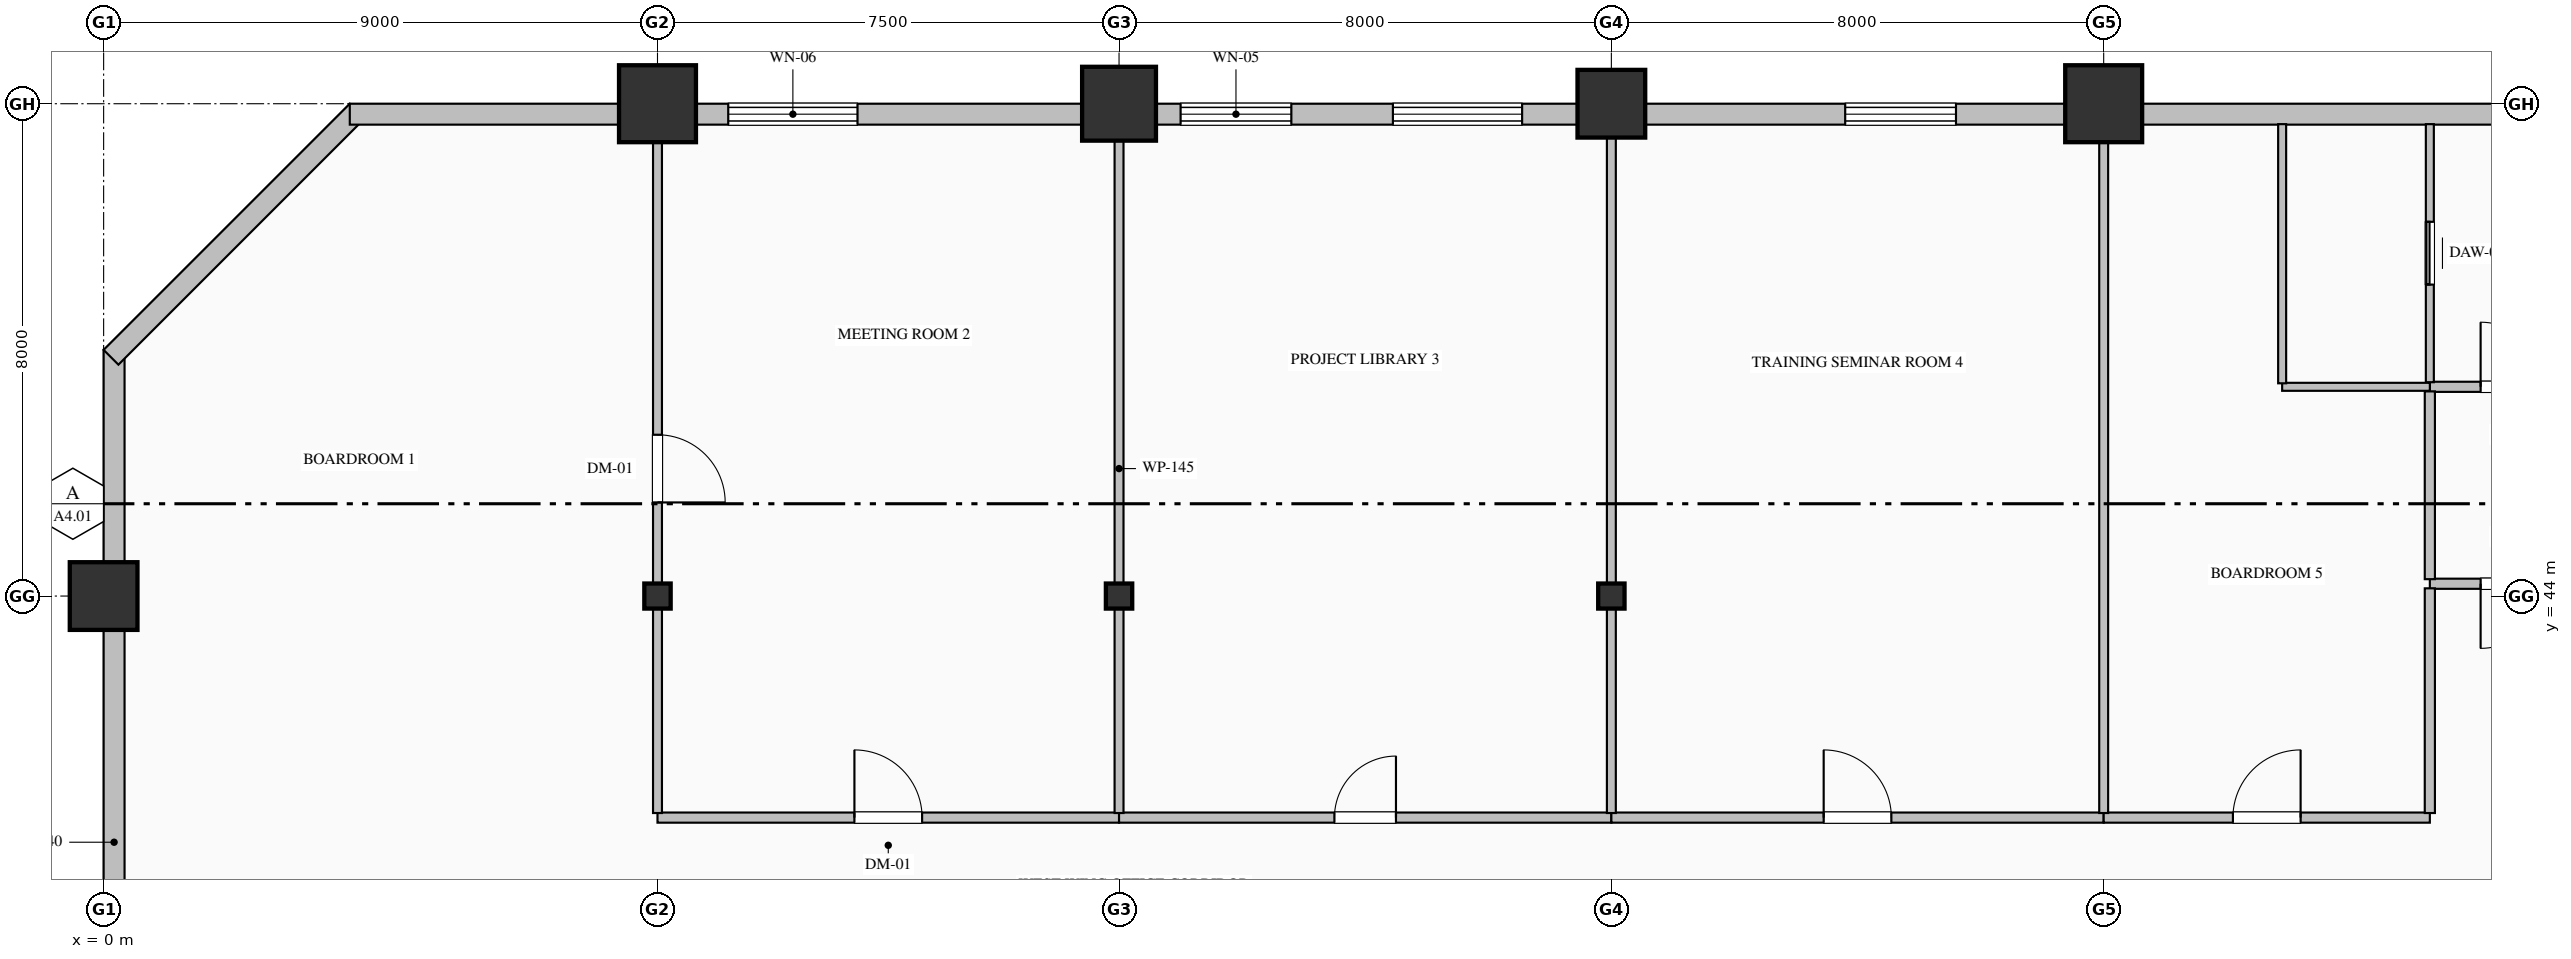
"""IFC4 building model, lengths in metres.
Left out: names, types, materials, properties, quantities, classifications, styles, units other than length and angle.
Written with IfcOpenShell. Run it as: python <this file> out.ifc"""

import sys

from ifc_helpers import new_model, si_unit, direction, frame, frame_2d, origin, origin_2d, place, context, subcontext, project, spatial, rectangle, hollow_rectangle, hollow_circle, i_section, extrude, element, fill, save


model = new_model("IFC4")
c1 = context("Model", 3, precision=1e-05, world=origin(), true_north=direction((0.0, 1.0)))
c2 = subcontext(c1, "Body", "Model", "MODEL_VIEW")
j1 = project(units=[si_unit("LENGTHUNIT", "METRE"), si_unit("PLANEANGLEUNIT", "RADIAN")], contexts=[c1])
p1 = place(None, origin())
s1 = spatial("IfcSite", under=j1, at=p1, CompositionType="ELEMENT")
p2 = place(p1, origin())
s2 = spatial("IfcBuilding", under=s1, at=p2, CompositionType="ELEMENT")
p3 = place(p2, frame((0.0, 0.0, 44.2)))
s3 = spatial("IfcBuildingStorey", under=s2, at=p3, CompositionType="ELEMENT", Elevation=44.2)
p4 = place(p3, frame((0.0, 44.0, 0.0), z_axis=(0.0, 0.0, 1.0), x_axis=(1.0, 0.0, 0.0)))
e1 = element("IfcColumn", 1, at=p4, inside=s3, PredefinedType="COLUMN", context=c2, shape_type="SweptSolid", body=[
    extrude(hollow_rectangle(XDim=1.1, YDim=1.1, WallThickness=0.04, at=origin_2d()), origin(), (0.0, 0.0, 1.0), 4.0),
])
p5 = place(p3, frame((9.0, 44.0, 0.0), z_axis=(0.0, 0.0, 1.0), x_axis=(1.0, 0.0, 0.0)))
e2 = element("IfcColumn", 2, at=p5, inside=s3, PredefinedType="COLUMN", context=c2, shape_type="SweptSolid", body=[
    extrude(i_section(OverallWidth=0.407, OverallDepth=0.428, WebThickness=0.02, FlangeThickness=0.035, FilletRadius=0.022, at=origin_2d()), origin(), (0.0, 0.0, 1.0), 4.0),
])
p6 = place(p3, frame((9.0, 52.0, 0.0), z_axis=(0.0, 0.0, 1.0), x_axis=(1.0, 0.0, 0.0)))
e3 = element("IfcColumn", 3, at=p6, inside=s3, PredefinedType="COLUMN", context=c2, shape_type="SweptSolid", body=[
    extrude(hollow_rectangle(XDim=1.25, YDim=1.25, WallThickness=0.045, at=origin_2d()), origin(), (0.0, 0.0, 1.0), 4.0),
])
p7 = place(p3, frame((16.5, 44.0, 0.0), z_axis=(0.0, 0.0, 1.0), x_axis=(1.0, 0.0, 0.0)))
e4 = element("IfcColumn", 4, at=p7, inside=s3, PredefinedType="COLUMN", context=c2, shape_type="SweptSolid", body=[
    extrude(i_section(OverallWidth=0.407, OverallDepth=0.428, WebThickness=0.02, FlangeThickness=0.035, FilletRadius=0.022, at=origin_2d()), origin(), (0.0, 0.0, 1.0), 4.0),
])
p8 = place(p3, frame((16.5, 52.0, 0.0), z_axis=(0.0, 0.0, 1.0), x_axis=(1.0, 0.0, 0.0)))
e5 = element("IfcColumn", 5, at=p8, inside=s3, PredefinedType="COLUMN", context=c2, shape_type="SweptSolid", body=[
    extrude(hollow_circle(Radius=0.6, WallThickness=0.04, at=origin_2d()), origin(), (0.0, 0.0, 1.0), 4.0),
])
p9 = place(p3, frame((24.5, 44.0, 0.0), z_axis=(0.0, 0.0, 1.0), x_axis=(1.0, 0.0, 0.0)))
e6 = element("IfcColumn", 6, at=p9, inside=s3, PredefinedType="COLUMN", context=c2, shape_type="SweptSolid", body=[
    extrude(i_section(OverallWidth=0.407, OverallDepth=0.428, WebThickness=0.02, FlangeThickness=0.035, FilletRadius=0.022, at=origin_2d()), origin(), (0.0, 0.0, 1.0), 4.0),
])
p10 = place(p3, frame((24.5, 52.0, 0.0), z_axis=(0.0, 0.0, 1.0), x_axis=(1.0, 0.0, 0.0)))
e7 = element("IfcColumn", 7, at=p10, inside=s3, PredefinedType="COLUMN", context=c2, shape_type="SweptSolid", body=[
    extrude(hollow_rectangle(XDim=1.1, YDim=1.1, WallThickness=0.04, at=origin_2d()), origin(), (0.0, 0.0, 1.0), 4.0),
])
p11 = place(p3, frame((32.5, 52.0, 0.0), z_axis=(0.0, 0.0, 1.0), x_axis=(1.0, 0.0, 0.0)))
e8 = element("IfcColumn", 8, at=p11, inside=s3, PredefinedType="COLUMN", context=c2, shape_type="SweptSolid", body=[
    extrude(hollow_rectangle(XDim=1.25, YDim=1.25, WallThickness=0.045, at=origin_2d()), origin(), (0.0, 0.0, 1.0), 4.0),
])
p12 = place(p3, frame((0.17, 32.0, 0.0), z_axis=(0.0, 0.0, 1.0), x_axis=(0.0, 1.0, 0.0)))
e9 = element("IfcWall", 9, at=p12, inside=s3, PredefinedType="SOLIDWALL", context=c2, shape_type="SweptSolid", body=[
    extrude(rectangle(XDim=16.0, YDim=0.34, at=frame_2d((8.0, 0.0))), origin(), (0.0, 0.0, 1.0), 3.25),
])
p13 = place(p3, frame((0.12, 47.88, 0.0), z_axis=(0.0, 0.0, 1.0), x_axis=(0.707106781187, 0.707106781187, 0.0)))
e10 = element("IfcWall", 10, at=p13, inside=s3, PredefinedType="SOLIDWALL", context=c2, shape_type="SweptSolid", body=[
    extrude(rectangle(XDim=5.657, YDim=0.34, at=frame_2d((2.828, 0.0))), origin(), (0.0, 0.0, 1.0), 3.75),
])
p14 = place(p3, frame((4.0, 51.83, 0.0), z_axis=(0.0, 0.0, 1.0), x_axis=(1.0, 0.0, 0.0)))
e11 = element("IfcWall", 11, at=p14, inside=s3, PredefinedType="SOLIDWALL", context=c2, shape_type="SweptSolid", body=[
    extrude(rectangle(XDim=36.52, YDim=0.34, at=frame_2d((18.26, 0.0))), origin(), (0.0, 0.0, 1.0), 3.25),
])
p15 = place(p14, frame((6.15, 0.0, 0.85)))
e12 = element("IfcOpeningElement", 12, at=p15, cuts=e11, PredefinedType="OPENING", context=c2, shape_type="SweptSolid", body=[
    extrude(rectangle(XDim=2.1, YDim=2.05, at=frame_2d((1.05, 1.025))), frame((0.0, 0.18, 0.0), z_axis=(0.0, -1.0, 0.0), x_axis=(1.0, 0.0, 0.0)), (0.0, 0.0, 1.0), 0.36),
])
p16 = place(p14, frame((13.5, 0.0, 0.85)))
e13 = element("IfcOpeningElement", 13, at=p16, cuts=e11, PredefinedType="OPENING", context=c2, shape_type="SweptSolid", body=[
    extrude(rectangle(XDim=1.8, YDim=2.05, at=frame_2d((0.9, 1.025))), frame((0.0, 0.18, 0.0), z_axis=(0.0, -1.0, 0.0), x_axis=(1.0, 0.0, 0.0)), (0.0, 0.0, 1.0), 0.36),
])
p17 = place(p14, frame((16.95, 0.0, 0.85)))
e14 = element("IfcOpeningElement", 14, at=p17, cuts=e11, PredefinedType="OPENING", context=c2, shape_type="SweptSolid", body=[
    extrude(rectangle(XDim=2.1, YDim=2.05, at=frame_2d((1.05, 1.025))), frame((0.0, 0.18, 0.0), z_axis=(0.0, -1.0, 0.0), x_axis=(1.0, 0.0, 0.0)), (0.0, 0.0, 1.0), 0.36),
])
p18 = place(p14, frame((24.3, 0.0, 0.85)))
e15 = element("IfcOpeningElement", 15, at=p18, cuts=e11, PredefinedType="OPENING", context=c2, shape_type="SweptSolid", body=[
    extrude(rectangle(XDim=1.8, YDim=2.05, at=frame_2d((0.9, 1.025))), frame((0.0, 0.18, 0.0), z_axis=(0.0, -1.0, 0.0), x_axis=(1.0, 0.0, 0.0)), (0.0, 0.0, 1.0), 0.36),
])
p19 = place(p3, frame((37.8, 47.4, 0.0), z_axis=(0.0, 0.0, 1.0), x_axis=(1.0, 0.0, 0.0)))
e16 = element("IfcWall", 16, at=p19, inside=s3, PredefinedType="PARTITIONING", context=c2, shape_type="SweptSolid", body=[
    extrude(rectangle(XDim=2.7, YDim=0.165, at=frame_2d((1.35, 0.0))), origin(), (0.0, 0.0, 1.0), 3.75),
])
p20 = place(p19, frame((0.825, 0.0, 0.0)))
e17 = element("IfcOpeningElement", 17, at=p20, cuts=e16, PredefinedType="OPENING", context=c2, shape_type="SweptSolid", body=[
    extrude(rectangle(XDim=1.05, YDim=2.15, at=frame_2d((0.525, 1.075))), frame((0.0, 0.093, 0.0), z_axis=(0.0, -1.0, 0.0), x_axis=(1.0, 0.0, 0.0)), (0.0, 0.0, 1.0), 0.185),
])
p21 = place(p3, frame((40.5, 44.2, 0.0), z_axis=(0.0, 0.0, 1.0), x_axis=(-1.0, 0.0, 0.0)))
e18 = element("IfcWall", 18, at=p21, inside=s3, PredefinedType="PARTITIONING", context=c2, shape_type="SweptSolid", body=[
    extrude(rectangle(XDim=2.7, YDim=0.165, at=frame_2d((1.35, 0.0))), origin(), (0.0, 0.0, 1.0), 3.75),
])
p22 = place(p21, frame((0.825, 0.0, 0.0)))
e19 = element("IfcOpeningElement", 19, at=p22, cuts=e18, PredefinedType="OPENING", context=c2, shape_type="SweptSolid", body=[
    extrude(rectangle(XDim=1.05, YDim=2.15, at=frame_2d((0.525, 1.075))), frame((0.0, 0.093, 0.0), z_axis=(0.0, -1.0, 0.0), x_axis=(1.0, 0.0, 0.0)), (0.0, 0.0, 1.0), 0.185),
])
p23 = place(p3, frame((37.8, 44.274, 0.0), z_axis=(0.0, 0.0, 1.0), x_axis=(0.0, 1.0, 0.0)))
e20 = element("IfcWall", 20, at=p23, inside=s3, PredefinedType="PARTITIONING", context=c2, shape_type="SweptSolid", body=[
    extrude(rectangle(XDim=3.051, YDim=0.165, at=frame_2d((1.525, 0.0))), origin(), (0.0, 0.0, 1.0), 3.75),
])
p24 = place(p3, frame((37.8, 47.475, 0.0), z_axis=(0.0, 0.0, 1.0), x_axis=(0.0, 1.0, 0.0)))
e21 = element("IfcWall", 21, at=p24, inside=s3, PredefinedType="PARTITIONING", context=c2, shape_type="SweptSolid", body=[
    extrude(rectangle(XDim=4.193, YDim=0.13, at=frame_2d((2.097, 0.0))), origin(), (0.0, 0.0, 1.0), 3.75),
])
p25 = place(p24, frame((1.587, 0.0, 0.0)))
e22 = element("IfcOpeningElement", 22, at=p25, cuts=e21, PredefinedType="OPENING", context=c2, shape_type="SweptSolid", body=[
    extrude(rectangle(XDim=1.02, YDim=2.15, at=frame_2d((0.51, 1.075))), frame((0.0, 0.075, 0.0), z_axis=(0.0, -1.0, 0.0), x_axis=(1.0, 0.0, 0.0)), (0.0, 0.0, 1.0), 0.15),
])
p26 = place(p3, frame((37.8, 47.4, 0.0), z_axis=(0.0, 0.0, 1.0), x_axis=(-1.0, 0.0, 0.0)))
e23 = element("IfcWall", 23, at=p26, inside=s3, PredefinedType="PARTITIONING", context=c2, shape_type="SweptSolid", body=[
    extrude(rectangle(XDim=2.4, YDim=0.13, at=frame_2d((1.2, 0.0))), origin(), (0.0, 0.0, 1.0), 3.75),
])
p27 = place(p3, frame((35.4, 47.457, 0.0), z_axis=(0.0, 0.0, 1.0), x_axis=(0.0, 1.0, 0.0)))
e24 = element("IfcWall", 24, at=p27, inside=s3, PredefinedType="PARTITIONING", context=c2, shape_type="SweptSolid", body=[
    extrude(rectangle(XDim=4.211, YDim=0.13, at=frame_2d((2.105, 0.0))), origin(), (0.0, 0.0, 1.0), 3.75),
])
p28 = place(p3, frame((9.0, 40.4, 0.0), z_axis=(0.0, 0.0, 1.0), x_axis=(1.0, 0.0, 0.0)))
e25 = element("IfcWall", 25, at=p28, inside=s3, PredefinedType="PARTITIONING", context=c2, shape_type="SweptSolid", body=[
    extrude(rectangle(XDim=7.5, YDim=0.165, at=frame_2d((3.75, 0.0))), origin(), (0.0, 0.0, 1.0), 3.75),
])
p29 = place(p28, frame((3.2, 0.0, 0.0)))
e26 = element("IfcOpeningElement", 26, at=p29, cuts=e25, PredefinedType="OPENING", context=c2, shape_type="SweptSolid", body=[
    extrude(rectangle(XDim=1.1, YDim=2.2, at=frame_2d((0.55, 1.1))), frame((0.0, 0.093, 0.0), z_axis=(0.0, -1.0, 0.0), x_axis=(1.0, 0.0, 0.0)), (0.0, 0.0, 1.0), 0.185),
])
p30 = place(p3, frame((16.5, 40.4, 0.0), z_axis=(0.0, 0.0, 1.0), x_axis=(1.0, 0.0, 0.0)))
e27 = element("IfcWall", 27, at=p30, inside=s3, PredefinedType="PARTITIONING", context=c2, shape_type="SweptSolid", body=[
    extrude(rectangle(XDim=8.0, YDim=0.165, at=frame_2d((4.0, 0.0))), origin(), (0.0, 0.0, 1.0), 3.75),
])
p31 = place(p30, frame((3.5, 0.0, 0.0)))
e28 = element("IfcOpeningElement", 28, at=p31, cuts=e27, PredefinedType="OPENING", context=c2, shape_type="SweptSolid", body=[
    extrude(rectangle(XDim=1.0, YDim=2.15, at=frame_2d((0.5, 1.075))), frame((0.0, 0.093, 0.0), z_axis=(0.0, -1.0, 0.0), x_axis=(1.0, 0.0, 0.0)), (0.0, 0.0, 1.0), 0.185),
])
p32 = place(p3, frame((24.5, 40.4, 0.0), z_axis=(0.0, 0.0, 1.0), x_axis=(1.0, 0.0, 0.0)))
e29 = element("IfcWall", 29, at=p32, inside=s3, PredefinedType="PARTITIONING", context=c2, shape_type="SweptSolid", body=[
    extrude(rectangle(XDim=8.0, YDim=0.165, at=frame_2d((4.0, 0.0))), origin(), (0.0, 0.0, 1.0), 3.75),
])
p33 = place(p32, frame((3.45, 0.0, 0.0)))
e30 = element("IfcOpeningElement", 30, at=p33, cuts=e29, PredefinedType="OPENING", context=c2, shape_type="SweptSolid", body=[
    extrude(rectangle(XDim=1.1, YDim=2.2, at=frame_2d((0.55, 1.1))), frame((0.0, 0.093, 0.0), z_axis=(0.0, -1.0, 0.0), x_axis=(1.0, 0.0, 0.0)), (0.0, 0.0, 1.0), 0.185),
])
p34 = place(p3, frame((32.5, 40.4, 0.0), z_axis=(0.0, 0.0, 1.0), x_axis=(1.0, 0.0, 0.0)))
e31 = element("IfcWall", 31, at=p34, inside=s3, PredefinedType="PARTITIONING", context=c2, shape_type="SweptSolid", body=[
    extrude(rectangle(XDim=5.3, YDim=0.165, at=frame_2d((2.65, 0.0))), origin(), (0.0, 0.0, 1.0), 3.75),
])
p35 = place(p34, frame((2.1, 0.0, 0.0)))
e32 = element("IfcOpeningElement", 32, at=p35, cuts=e31, PredefinedType="OPENING", context=c2, shape_type="SweptSolid", body=[
    extrude(rectangle(XDim=1.1, YDim=2.2, at=frame_2d((0.55, 1.1))), frame((0.0, 0.093, 0.0), z_axis=(0.0, -1.0, 0.0), x_axis=(1.0, 0.0, 0.0)), (0.0, 0.0, 1.0), 0.185),
])
p36 = place(p3, frame((37.8, 40.475, 0.0), z_axis=(0.0, 0.0, 1.0), x_axis=(0.0, 1.0, 0.0)))
e33 = element("IfcWall", 33, at=p36, inside=s3, PredefinedType="PARTITIONING", context=c2, shape_type="SweptSolid", body=[
    extrude(rectangle(XDim=3.651, YDim=0.165, at=frame_2d((1.825, 0.0))), origin(), (0.0, 0.0, 1.0), 3.75),
])
p37 = place(p3, frame((9.0, 51.668, 0.0), z_axis=(0.0, 0.0, 1.0), x_axis=(0.0, -1.0, 0.0)))
e34 = element("IfcWall", 34, at=p37, inside=s3, PredefinedType="PARTITIONING", context=c2, shape_type="SweptSolid", body=[
    extrude(rectangle(XDim=11.193, YDim=0.145, at=frame_2d((5.597, 0.0))), origin(), (0.0, 0.0, 1.0), 3.042),
])
p38 = place(p37, frame((5.047, 0.0, 0.0)))
e35 = element("IfcOpeningElement", 35, at=p38, cuts=e34, PredefinedType="OPENING", context=c2, shape_type="SweptSolid", body=[
    extrude(rectangle(XDim=1.1, YDim=2.2, at=frame_2d((0.55, 1.1))), frame((0.0, 0.083, 0.0), z_axis=(0.0, -1.0, 0.0), x_axis=(1.0, 0.0, 0.0)), (0.0, 0.0, 1.0), 0.165),
])
for number, where, z_axis, x_axis in (
    (36, (16.5, 51.668, 0.0), (0.0, 0.0, 1.0), (0.0, -1.0, 0.0)),
    (37, (24.5, 51.668, 0.0), (0.0, 0.0, 1.0), (0.0, -1.0, 0.0)),
):
    element("IfcWall", number, at=place(p3, frame(where, z_axis=z_axis, x_axis=x_axis)), inside=s3, PredefinedType="PARTITIONING", context=c2, shape_type="SweptSolid", body=[
        extrude(rectangle(XDim=11.193, YDim=0.145, at=frame_2d((5.597, 0.0))), origin(), (0.0, 0.0, 1.0), 3.042),
    ])
p39 = place(p3, frame((32.5, 51.668, 0.0), z_axis=(0.0, 0.0, 1.0), x_axis=(0.0, -1.0, 0.0)))
e38 = element("IfcWall", 38, at=p39, inside=s3, PredefinedType="PARTITIONING", context=c2, shape_type="SweptSolid", body=[
    extrude(rectangle(XDim=11.193, YDim=0.145, at=frame_2d((5.597, 0.0))), origin(), (0.0, 0.0, 1.0), 3.75),
])
p40 = place(p15, origin())
e39 = element("IfcWindow", 39, at=p40, inside=s3, PartitioningType="TRIPLE_PANEL_VERTICAL", PredefinedType="WINDOW", context=c2, shape_type="SweptSolid", body=[
    extrude(rectangle(XDim=2.1, YDim=2.05, at=frame_2d((1.05, 1.025))), frame((0.0, 0.15, 0.0), z_axis=(0.0, -1.0, 0.0), x_axis=(1.0, 0.0, 0.0)), (0.0, 0.0, 1.0), 0.06),
])
fill(e12, e39)
p41 = place(p16, origin())
e40 = element("IfcWindow", 40, at=p41, inside=s3, PartitioningType="TRIPLE_PANEL_VERTICAL", PredefinedType="WINDOW", context=c2, shape_type="SweptSolid", body=[
    extrude(rectangle(XDim=1.8, YDim=2.05, at=frame_2d((0.9, 1.025))), frame((0.0, 0.15, 0.0), z_axis=(0.0, -1.0, 0.0), x_axis=(1.0, 0.0, 0.0)), (0.0, 0.0, 1.0), 0.06),
])
fill(e13, e40)
p42 = place(p17, origin())
e41 = element("IfcWindow", 41, at=p42, inside=s3, PartitioningType="TRIPLE_PANEL_VERTICAL", PredefinedType="WINDOW", context=c2, shape_type="SweptSolid", body=[
    extrude(rectangle(XDim=2.1, YDim=2.05, at=frame_2d((1.05, 1.025))), frame((0.0, 0.15, 0.0), z_axis=(0.0, -1.0, 0.0), x_axis=(1.0, 0.0, 0.0)), (0.0, 0.0, 1.0), 0.06),
])
fill(e14, e41)
p43 = place(p18, origin())
e42 = element("IfcWindow", 42, at=p43, inside=s3, PartitioningType="TRIPLE_PANEL_VERTICAL", PredefinedType="WINDOW", context=c2, shape_type="SweptSolid", body=[
    extrude(rectangle(XDim=1.8, YDim=2.05, at=frame_2d((0.9, 1.025))), frame((0.0, 0.15, 0.0), z_axis=(0.0, -1.0, 0.0), x_axis=(1.0, 0.0, 0.0)), (0.0, 0.0, 1.0), 0.06),
])
fill(e15, e42)
p44 = place(p20, origin())
e43 = element("IfcDoor", 43, at=p44, inside=s3, OperationType="SINGLE_SWING_LEFT", PredefinedType="DOOR", context=c2, shape_type="SweptSolid", body=[
    extrude(rectangle(XDim=1.05, YDim=2.15, at=frame_2d((0.525, 1.075))), frame((0.0, 0.025, 0.0), z_axis=(0.0, -1.0, 0.0), x_axis=(1.0, 0.0, 0.0)), (0.0, 0.0, 1.0), 0.05),
])
fill(e17, e43)
p45 = place(p22, origin())
e44 = element("IfcDoor", 44, at=p45, inside=s3, OperationType="SINGLE_SWING_RIGHT", PredefinedType="DOOR", context=c2, shape_type="SweptSolid", body=[
    extrude(rectangle(XDim=1.05, YDim=2.15, at=frame_2d((0.525, 1.075))), frame((0.0, 0.025, 0.0), z_axis=(0.0, -1.0, 0.0), x_axis=(1.0, 0.0, 0.0)), (0.0, 0.0, 1.0), 0.05),
])
fill(e19, e44)
p46 = place(p25, origin())
e45 = element("IfcDoor", 45, at=p46, inside=s3, OperationType="SLIDING_TO_LEFT", PredefinedType="DOOR", context=c2, shape_type="SweptSolid", body=[
    extrude(rectangle(XDim=1.02, YDim=2.15, at=frame_2d((0.51, 1.075))), frame((0.0, 0.025, 0.0), z_axis=(0.0, -1.0, 0.0), x_axis=(1.0, 0.0, 0.0)), (0.0, 0.0, 1.0), 0.05),
])
fill(e22, e45)
p47 = place(p38, origin())
e46 = element("IfcDoor", 46, at=p47, inside=s3, OperationType="SINGLE_SWING_RIGHT", PredefinedType="DOOR", context=c2, shape_type="SweptSolid", body=[
    extrude(rectangle(XDim=1.1, YDim=2.2, at=frame_2d((0.55, 1.1))), frame((0.0, 0.025, 0.0), z_axis=(0.0, -1.0, 0.0), x_axis=(1.0, 0.0, 0.0)), (0.0, 0.0, 1.0), 0.05),
])
fill(e35, e46)
p48 = place(p29, origin())
e47 = element("IfcDoor", 47, at=p48, inside=s3, OperationType="SINGLE_SWING_LEFT", PredefinedType="DOOR", context=c2, shape_type="SweptSolid", body=[
    extrude(rectangle(XDim=1.1, YDim=2.2, at=frame_2d((0.55, 1.1))), frame((0.0, 0.025, 0.0), z_axis=(0.0, -1.0, 0.0), x_axis=(1.0, 0.0, 0.0)), (0.0, 0.0, 1.0), 0.05),
])
fill(e26, e47)
p49 = place(p31, origin())
e48 = element("IfcDoor", 48, at=p49, inside=s3, OperationType="SINGLE_SWING_RIGHT", PredefinedType="DOOR", context=c2, shape_type="SweptSolid", body=[
    extrude(rectangle(XDim=1.0, YDim=2.15, at=frame_2d((0.5, 1.075))), frame((0.0, 0.025, 0.0), z_axis=(0.0, -1.0, 0.0), x_axis=(1.0, 0.0, 0.0)), (0.0, 0.0, 1.0), 0.05),
])
fill(e28, e48)
p50 = place(p33, origin())
e49 = element("IfcDoor", 49, at=p50, inside=s3, OperationType="SINGLE_SWING_LEFT", PredefinedType="DOOR", context=c2, shape_type="SweptSolid", body=[
    extrude(rectangle(XDim=1.1, YDim=2.2, at=frame_2d((0.55, 1.1))), frame((0.0, 0.025, 0.0), z_axis=(0.0, -1.0, 0.0), x_axis=(1.0, 0.0, 0.0)), (0.0, 0.0, 1.0), 0.05),
])
fill(e30, e49)
p51 = place(p35, origin())
e50 = element("IfcDoor", 50, at=p51, inside=s3, OperationType="SINGLE_SWING_RIGHT", PredefinedType="DOOR", context=c2, shape_type="SweptSolid", body=[
    extrude(rectangle(XDim=1.1, YDim=2.2, at=frame_2d((0.55, 1.1))), frame((0.0, 0.025, 0.0), z_axis=(0.0, -1.0, 0.0), x_axis=(1.0, 0.0, 0.0)), (0.0, 0.0, 1.0), 0.05),
])
fill(e32, e50)
save(model, sys.argv[1])
